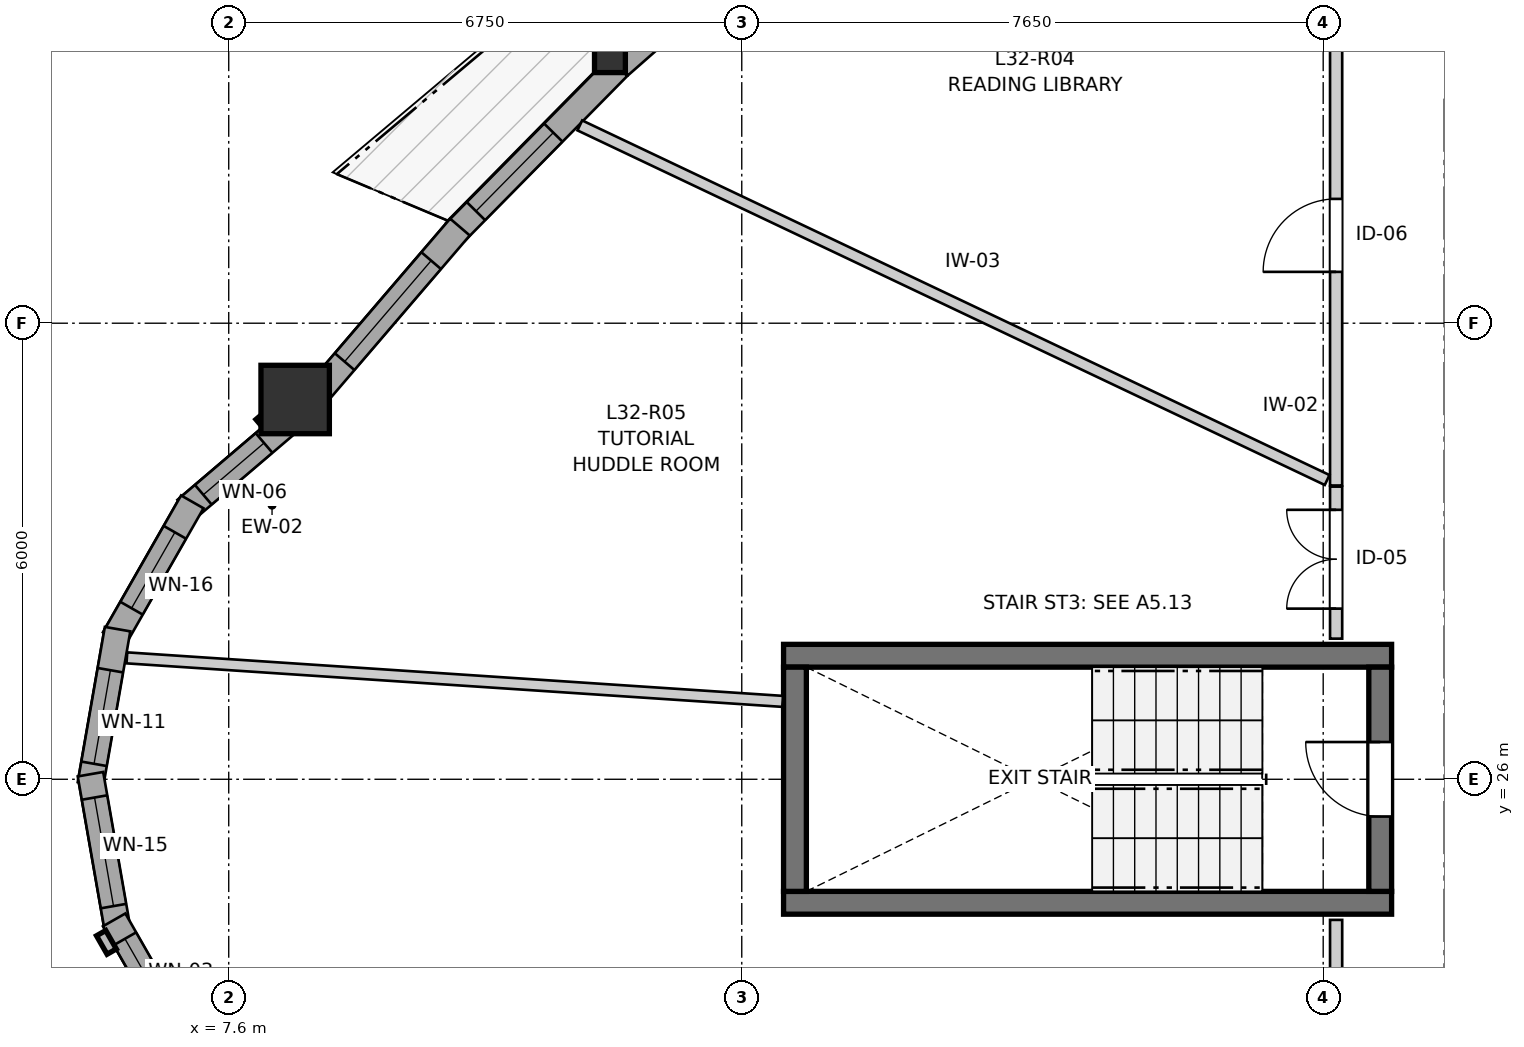
"""IFC4 building model, lengths in metres.
Left out: names, types, materials, properties, quantities, classifications, styles, units other than length and angle.
Written with IfcOpenShell. Run it as: python <this file> out.ifc"""

import sys

from ifc_helpers import new_model, si_unit, direction, frame, frame_2d, origin, origin_2d, place, context, subcontext, project, spatial, rectangle, i_section, extrude, source, transform, mapped, element, fill, save


model = new_model("IFC4")
c1 = context("Model", 3, precision=1e-05, world=origin(), true_north=direction((0.0, 1.0)))
c2 = subcontext(c1, "Body", "Model", "MODEL_VIEW")
j1 = project(units=[si_unit("LENGTHUNIT", "METRE"), si_unit("PLANEANGLEUNIT", "RADIAN")], contexts=[c1])
p1 = place(None, origin())
s1 = spatial("IfcSite", under=j1, at=p1, CompositionType="ELEMENT")
p2 = place(p1, origin())
s2 = spatial("IfcBuilding", under=s1, at=p2, CompositionType="ELEMENT")
p3 = place(p2, frame((0.0, 0.0, 108.8)))
s3 = spatial("IfcBuildingStorey", under=s2, at=p3, CompositionType="ELEMENT", Elevation=108.8)
for number, where, z_axis, x_axis in (
    (1, (14.9, 24.375, 0.0), (0.0, 0.0, 1.0), (1.0, 0.0, 0.0)),
    (2, (22.9, 27.625, 0.0), (0.0, 0.0, 1.0), (-1.0, 0.0, 0.0)),
):
    element("IfcWall", number, at=place(p3, frame(where, z_axis=z_axis, x_axis=x_axis)), inside=s3, PredefinedType="SHEAR", context=c2, shape_type="SweptSolid", body=[
        extrude(rectangle(XDim=8.0, YDim=0.3, at=frame_2d((4.0, 0.0))), origin(), (0.0, 0.0, 1.0), 2.935),
    ])
p4 = place(p3, frame((15.05, 27.475, 0.0), z_axis=(0.0, 0.0, 1.0), x_axis=(0.0, -1.0, 0.0)))
e3 = element("IfcWall", 3, at=p4, inside=s3, PredefinedType="SHEAR", context=c2, shape_type="SweptSolid", body=[
    extrude(rectangle(XDim=2.95, YDim=0.3, at=frame_2d((1.475, 0.0))), origin(), (0.0, 0.0, 1.0), 2.935),
])
p5 = place(p3, frame((22.75, 24.525, 0.0), z_axis=(0.0, 0.0, 1.0), x_axis=(0.0, 1.0, 0.0)))
e4 = element("IfcWall", 4, at=p5, inside=s3, PredefinedType="SHEAR", context=c2, shape_type="SweptSolid", body=[
    extrude(rectangle(XDim=2.95, YDim=0.3, at=frame_2d((1.475, 0.0))), origin(), (0.0, 0.0, 1.0), 2.935),
])
p6 = place(p5, frame((0.985, 0.0, 0.0)))
e5 = element("IfcOpeningElement", 5, at=p6, cuts=e4, PredefinedType="OPENING", context=c2, shape_type="SweptSolid", body=[
    extrude(rectangle(XDim=0.98, YDim=2.15, at=frame_2d((0.49, 1.075))), frame((0.0, 0.16, 0.0), z_axis=(0.0, -1.0, 0.0), x_axis=(1.0, 0.0, 0.0)), (0.0, 0.0, 1.0), 0.32),
])
m1 = source(origin(), c2, "Body", "SweptSolid", [
    extrude(rectangle(XDim=0.9, YDim=0.9, at=origin_2d()), origin(), (0.0, 0.0, 1.0), 2.935),
])
p7 = place(p3, frame((8.474, 30.996, 0.0), z_axis=(0.0, 0.0, 1.0), x_axis=(1.0, 0.0, 0.0)))
e6 = element("IfcColumn", 6, at=p7, inside=s3, PredefinedType="COLUMN", context=c2, shape_type="MappedRepresentation", body=[
    mapped(m1, transform((0.0, 0.0, 0.0), x_axis=(1.0, 0.0, 0.0), y_axis=(0.0, 1.0, 0.0), z_axis=(0.0, 0.0, 1.0), scale=1.0)),
])
m2 = source(origin(), c2, "Body", "SweptSolid", [
    extrude(i_section(OverallWidth=0.406, OverallDepth=0.416, WebThickness=0.027, FlangeThickness=0.044, FilletRadius=0.015, at=origin_2d()), origin(), (0.0, 0.0, 1.0), 2.935),
])
p8 = place(p3, frame((12.616, 35.505, 0.0), z_axis=(0.0, 0.0, 1.0), x_axis=(1.0, 0.0, 0.0)))
e7 = element("IfcColumn", 7, at=p8, inside=s3, PredefinedType="PILASTER", context=c2, shape_type="MappedRepresentation", body=[
    mapped(m2, transform((0.0, 0.0, 0.0), x_axis=(1.0, 0.0, 0.0), y_axis=(0.0, 1.0, 0.0), z_axis=(0.0, 0.0, 1.0), scale=1.0)),
])
p9 = place(p3, frame((8.409, 30.718, 0.0), z_axis=(0.0, 0.0, 1.0), x_axis=(-0.761134405886, -0.648594184507, 0.0)))
e8 = element("IfcWall", 8, at=p9, inside=s3, PredefinedType="SOLIDWALL", context=c2, shape_type="SweptSolid", body=[
    extrude(rectangle(XDim=1.805, YDim=0.34, at=frame_2d((0.902, 0.0))), origin(), (0.0, 0.0, 1.0), 2.465),
])
p10 = place(p9, frame((0.452, 0.0, 0.82)))
e9 = element("IfcOpeningElement", 9, at=p10, cuts=e8, PredefinedType="OPENING", context=c2, shape_type="SweptSolid", body=[
    extrude(rectangle(XDim=1.05, YDim=1.45, at=frame_2d((0.525, 0.725))), frame((0.0, 0.18, 0.0), z_axis=(0.0, -1.0, 0.0), x_axis=(1.0, 0.0, 0.0)), (0.0, 0.0, 1.0), 0.36),
])
p11 = place(p3, frame((7.121, 29.65, 0.0), z_axis=(0.0, 0.0, 1.0), x_axis=(-0.496037473582, -0.868301114132, 0.0)))
e10 = element("IfcWall", 10, at=p11, inside=s3, PredefinedType="SOLIDWALL", context=c2, shape_type="SweptSolid", body=[
    extrude(rectangle(XDim=2.073, YDim=0.34, at=frame_2d((1.037, 0.0))), origin(), (0.0, 0.0, 1.0), 2.465),
])
p12 = place(p11, frame((0.461, 0.0, 0.82)))
e11 = element("IfcOpeningElement", 11, at=p12, cuts=e10, PredefinedType="OPENING", context=c2, shape_type="SweptSolid", body=[
    extrude(rectangle(XDim=1.15, YDim=1.2, at=frame_2d((0.575, 0.6))), frame((0.0, 0.18, 0.0), z_axis=(0.0, -1.0, 0.0), x_axis=(1.0, 0.0, 0.0)), (0.0, 0.0, 1.0), 0.36),
])
p13 = place(p3, frame((6.138, 27.975, 0.0), z_axis=(0.0, 0.0, 1.0), x_axis=(-0.172186061474, -0.985064444711, 0.0)))
e12 = element("IfcWall", 12, at=p13, inside=s3, PredefinedType="SOLIDWALL", context=c2, shape_type="SweptSolid", body=[
    extrude(rectangle(XDim=2.073, YDim=0.34, at=frame_2d((1.037, 0.0))), origin(), (0.0, 0.0, 1.0), 2.465),
])
p14 = place(p13, frame((0.549, 0.0, 0.82)))
e13 = element("IfcOpeningElement", 13, at=p14, cuts=e12, PredefinedType="OPENING", context=c2, shape_type="SweptSolid", body=[
    extrude(rectangle(XDim=1.25, YDim=1.35, at=frame_2d((0.625, 0.675))), frame((0.0, 0.18, 0.0), z_axis=(0.0, -1.0, 0.0), x_axis=(1.0, 0.0, 0.0)), (0.0, 0.0, 1.0), 0.36),
])
p15 = place(p3, frame((5.781, 26.067, 0.0), z_axis=(0.0, 0.0, 1.0), x_axis=(0.172186061474, -0.985064444711, 0.0)))
e14 = element("IfcWall", 14, at=p15, inside=s3, PredefinedType="SOLIDWALL", context=c2, shape_type="SweptSolid", body=[
    extrude(rectangle(XDim=2.073, YDim=0.34, at=frame_2d((1.037, 0.0))), origin(), (0.0, 0.0, 1.0), 2.465),
])
p16 = place(p15, frame((0.312, 0.0, 0.82)))
e15 = element("IfcOpeningElement", 15, at=p16, cuts=e14, PredefinedType="OPENING", context=c2, shape_type="SweptSolid", body=[
    extrude(rectangle(XDim=1.45, YDim=1.25, at=frame_2d((0.725, 0.625))), frame((0.0, 0.18, 0.0), z_axis=(0.0, -1.0, 0.0), x_axis=(1.0, 0.0, 0.0)), (0.0, 0.0, 1.0), 0.36),
])
p17 = place(p3, frame((6.092, 24.15, 0.0), z_axis=(0.0, 0.0, 1.0), x_axis=(0.496037473582, -0.868301114132, 0.0)))
e16 = element("IfcWall", 16, at=p17, inside=s3, PredefinedType="SOLIDWALL", context=c2, shape_type="SweptSolid", body=[
    extrude(rectangle(XDim=2.073, YDim=0.34, at=frame_2d((1.037, 0.0))), origin(), (0.0, 0.0, 1.0), 2.465),
])
p18 = place(p17, frame((0.287, 0.0, 0.82)))
e17 = element("IfcOpeningElement", 17, at=p18, cuts=e16, PredefinedType="OPENING", context=c2, shape_type="SweptSolid", body=[
    extrude(rectangle(XDim=1.5, YDim=1.45, at=frame_2d((0.75, 0.725))), frame((0.0, 0.18, 0.0), z_axis=(0.0, -1.0, 0.0), x_axis=(1.0, 0.0, 0.0)), (0.0, 0.0, 1.0), 0.36),
])
p19 = place(p3, frame((14.997, 37.37, 0.0), z_axis=(0.0, 0.0, 1.0), x_axis=(-0.751446130796, -0.659794447166, 0.0)))
e18 = element("IfcWall", 18, at=p19, inside=s3, PredefinedType="SOLIDWALL", context=c2, shape_type="SweptSolid", body=[
    extrude(rectangle(XDim=3.0, YDim=0.34, at=frame_2d((1.5, 0.0))), origin(), (0.0, 0.0, 1.0), 2.465),
])
p20 = place(p19, frame((1.035, 0.0, 0.82)))
e19 = element("IfcOpeningElement", 19, at=p20, cuts=e18, PredefinedType="OPENING", context=c2, shape_type="SweptSolid", body=[
    extrude(rectangle(XDim=0.95, YDim=1.35, at=frame_2d((0.475, 0.675))), frame((0.0, 0.18, 0.0), z_axis=(0.0, -1.0, 0.0), x_axis=(1.0, 0.0, 0.0)), (0.0, 0.0, 1.0), 0.36),
])
p21 = place(p3, frame((12.723, 35.372, 0.0), z_axis=(0.0, 0.0, 1.0), x_axis=(-0.701922597509, -0.71225323243, 0.0)))
e20 = element("IfcWall", 20, at=p21, inside=s3, PredefinedType="SOLIDWALL", context=c2, shape_type="SweptSolid", body=[
    extrude(rectangle(XDim=3.049, YDim=0.34, at=frame_2d((1.524, 0.0))), origin(), (0.0, 0.0, 1.0), 2.465),
])
p22 = place(p21, frame((1.214, 0.0, 0.82)))
e21 = element("IfcOpeningElement", 21, at=p22, cuts=e20, PredefinedType="OPENING", context=c2, shape_type="SweptSolid", body=[
    extrude(rectangle(XDim=1.45, YDim=1.25, at=frame_2d((0.725, 0.625))), frame((0.0, 0.18, 0.0), z_axis=(0.0, -1.0, 0.0), x_axis=(1.0, 0.0, 0.0)), (0.0, 0.0, 1.0), 0.36),
])
p23 = place(p3, frame((10.642, 33.265, 0.0), z_axis=(0.0, 0.0, 1.0), x_axis=(-0.650694416433, -0.759339697647, 0.0)))
e22 = element("IfcWall", 22, at=p23, inside=s3, PredefinedType="SOLIDWALL", context=c2, shape_type="SweptSolid", body=[
    extrude(rectangle(XDim=2.903, YDim=0.34, at=frame_2d((1.452, 0.0))), origin(), (0.0, 0.0, 1.0), 2.465),
])
p24 = place(p23, frame((0.582, 0.0, 0.82)))
e23 = element("IfcOpeningElement", 23, at=p24, cuts=e22, PredefinedType="OPENING", context=c2, shape_type="SweptSolid", body=[
    extrude(rectangle(XDim=1.75, YDim=1.3, at=frame_2d((0.875, 0.65))), frame((0.0, 0.18, 0.0), z_axis=(0.0, -1.0, 0.0), x_axis=(1.0, 0.0, 0.0)), (0.0, 0.0, 1.0), 0.36),
])
p25 = place(p3, frame((22.17, 29.865, 0.0), z_axis=(0.0, 0.0, 1.0), x_axis=(0.0, 1.0, 0.0)))
e24 = element("IfcWall", 24, at=p25, inside=s3, PredefinedType="PARTITIONING", context=c2, shape_type="SweptSolid", body=[
    extrude(rectangle(XDim=6.565, YDim=0.16, at=frame_2d((3.282, 0.0))), origin(), (0.0, 0.0, 1.0), 2.935),
])
p26 = place(p25, frame((2.811, 0.0, 0.0)))
e25 = element("IfcOpeningElement", 25, at=p26, cuts=e24, PredefinedType="OPENING", context=c2, shape_type="SweptSolid", body=[
    extrude(rectangle(XDim=0.96, YDim=2.1, at=frame_2d((0.48, 1.05))), frame((0.0, 0.09, 0.0), z_axis=(0.0, -1.0, 0.0), x_axis=(1.0, 0.0, 0.0)), (0.0, 0.0, 1.0), 0.18),
])
p27 = place(p3, frame((22.17, 20.14, 0.0), z_axis=(0.0, 0.0, 1.0), x_axis=(0.0, 1.0, 0.0)))
e26 = element("IfcWall", 26, at=p27, inside=s3, PredefinedType="PARTITIONING", context=c2, shape_type="SweptSolid", body=[
    extrude(rectangle(XDim=4.01, YDim=0.16, at=frame_2d((2.005, 0.0))), origin(), (0.0, 0.0, 1.0), 2.935),
])
p28 = place(p27, frame((1.375, 0.0, 0.0)))
e27 = element("IfcOpeningElement", 27, at=p28, cuts=e26, PredefinedType="OPENING", context=c2, shape_type="SweptSolid", body=[
    extrude(rectangle(XDim=1.3, YDim=2.1, at=frame_2d((0.65, 1.05))), frame((0.0, 0.09, 0.0), z_axis=(0.0, -1.0, 0.0), x_axis=(1.0, 0.0, 0.0)), (0.0, 0.0, 1.0), 0.18),
])
p29 = place(p3, frame((22.17, 27.85, 0.0), z_axis=(0.0, 0.0, 1.0), x_axis=(0.0, 1.0, 0.0)))
e28 = element("IfcWall", 28, at=p29, inside=s3, PredefinedType="PARTITIONING", context=c2, shape_type="SweptSolid", body=[
    extrude(rectangle(XDim=2.0, YDim=0.16, at=frame_2d((1.0, 0.0))), origin(), (0.0, 0.0, 1.0), 2.935),
])
p30 = place(p29, frame((0.395, 0.0, 0.0)))
e29 = element("IfcOpeningElement", 29, at=p30, cuts=e28, PredefinedType="OPENING", context=c2, shape_type="SweptSolid", body=[
    extrude(rectangle(XDim=1.3, YDim=2.1, at=frame_2d((0.65, 1.05))), frame((0.0, 0.09, 0.0), z_axis=(0.0, -1.0, 0.0), x_axis=(1.0, 0.0, 0.0)), (0.0, 0.0, 1.0), 0.18),
])
p31 = place(p3, frame((12.219, 34.602, 0.0), z_axis=(0.0, 0.0, 1.0), x_axis=(0.90346129999, -0.428669662351, 0.0)))
e30 = element("IfcWall", 30, at=p31, inside=s3, PredefinedType="PARTITIONING", context=c2, shape_type="SweptSolid", body=[
    extrude(rectangle(XDim=10.883, YDim=0.145, at=frame_2d((5.441, 0.0))), origin(), (0.0, 0.0, 1.0), 2.935),
])
p32 = place(p3, frame((6.26, 27.597, 0.0), z_axis=(0.0, 0.0, 1.0), x_axis=(0.997805352235, -0.066215398902, 0.0)))
e31 = element("IfcWall", 31, at=p32, inside=s3, PredefinedType="PARTITIONING", context=c2, shape_type="SweptSolid", body=[
    extrude(rectangle(XDim=8.646, YDim=0.145, at=frame_2d((4.323, 0.0))), origin(), (0.0, 0.0, 1.0), 2.935),
])
m3 = source(origin(), c2, "Body", "SweptSolid", [
    extrude(rectangle(XDim=1.05, YDim=1.45, at=frame_2d((0.525, 0.725))), frame((0.0, 0.03, 0.0), z_axis=(0.0, -1.0, 0.0), x_axis=(1.0, 0.0, 0.0)), (0.0, 0.0, 1.0), 0.06),
])
p33 = place(p10, origin())
e32 = element("IfcWindow", 32, at=p33, inside=s3, PartitioningType="SINGLE_PANEL", PredefinedType="WINDOW", context=c2, shape_type="MappedRepresentation", body=[
    mapped(m3, transform((0.0, 0.0, 0.0), x_axis=(1.0, 0.0, 0.0), y_axis=(0.0, 1.0, 0.0), z_axis=(0.0, 0.0, 1.0), scale=1.0)),
])
fill(e9, e32)
m4 = source(origin(), c2, "Body", "SweptSolid", [
    extrude(rectangle(XDim=1.15, YDim=1.2, at=frame_2d((0.575, 0.6))), frame((0.0, 0.03, 0.0), z_axis=(0.0, -1.0, 0.0), x_axis=(1.0, 0.0, 0.0)), (0.0, 0.0, 1.0), 0.06),
])
p34 = place(p12, origin())
e33 = element("IfcWindow", 33, at=p34, inside=s3, PartitioningType="SINGLE_PANEL", PredefinedType="WINDOW", context=c2, shape_type="MappedRepresentation", body=[
    mapped(m4, transform((0.0, 0.0, 0.0), x_axis=(1.0, 0.0, 0.0), y_axis=(0.0, 1.0, 0.0), z_axis=(0.0, 0.0, 1.0), scale=1.0)),
])
fill(e11, e33)
m5 = source(origin(), c2, "Body", "SweptSolid", [
    extrude(rectangle(XDim=1.25, YDim=1.35, at=frame_2d((0.625, 0.675))), frame((0.0, 0.03, 0.0), z_axis=(0.0, -1.0, 0.0), x_axis=(1.0, 0.0, 0.0)), (0.0, 0.0, 1.0), 0.06),
])
p35 = place(p14, origin())
e34 = element("IfcWindow", 34, at=p35, inside=s3, PartitioningType="SINGLE_PANEL", PredefinedType="WINDOW", context=c2, shape_type="MappedRepresentation", body=[
    mapped(m5, transform((0.0, 0.0, 0.0), x_axis=(1.0, 0.0, 0.0), y_axis=(0.0, 1.0, 0.0), z_axis=(0.0, 0.0, 1.0), scale=1.0)),
])
fill(e13, e34)
m6 = source(origin(), c2, "Body", "SweptSolid", [
    extrude(rectangle(XDim=1.45, YDim=1.25, at=frame_2d((0.725, 0.625))), frame((0.0, 0.03, 0.0), z_axis=(0.0, -1.0, 0.0), x_axis=(1.0, 0.0, 0.0)), (0.0, 0.0, 1.0), 0.06),
])
p36 = place(p16, origin())
e35 = element("IfcWindow", 35, at=p36, inside=s3, PartitioningType="SINGLE_PANEL", PredefinedType="WINDOW", context=c2, shape_type="MappedRepresentation", body=[
    mapped(m6, transform((0.0, 0.0, 0.0), x_axis=(1.0, 0.0, 0.0), y_axis=(0.0, 1.0, 0.0), z_axis=(0.0, 0.0, 1.0), scale=1.0)),
])
fill(e15, e35)
m7 = source(origin(), c2, "Body", "SweptSolid", [
    extrude(rectangle(XDim=1.5, YDim=1.45, at=frame_2d((0.75, 0.725))), frame((0.0, 0.03, 0.0), z_axis=(0.0, -1.0, 0.0), x_axis=(1.0, 0.0, 0.0)), (0.0, 0.0, 1.0), 0.06),
])
p37 = place(p18, origin())
e36 = element("IfcWindow", 36, at=p37, inside=s3, PartitioningType="SINGLE_PANEL", PredefinedType="WINDOW", context=c2, shape_type="MappedRepresentation", body=[
    mapped(m7, transform((0.0, 0.0, 0.0), x_axis=(1.0, 0.0, 0.0), y_axis=(0.0, 1.0, 0.0), z_axis=(0.0, 0.0, 1.0), scale=1.0)),
])
fill(e17, e36)
p38 = place(p22, origin())
e37 = element("IfcWindow", 37, at=p38, inside=s3, PartitioningType="SINGLE_PANEL", PredefinedType="WINDOW", context=c2, shape_type="MappedRepresentation", body=[
    mapped(m6, transform((0.0, 0.0, 0.0), x_axis=(1.0, 0.0, 0.0), y_axis=(0.0, 1.0, 0.0), z_axis=(0.0, 0.0, 1.0), scale=1.0)),
])
fill(e21, e37)
m8 = source(origin(), c2, "Body", "SweptSolid", [
    extrude(rectangle(XDim=1.75, YDim=1.3, at=frame_2d((0.875, 0.65))), frame((0.0, 0.03, 0.0), z_axis=(0.0, -1.0, 0.0), x_axis=(1.0, 0.0, 0.0)), (0.0, 0.0, 1.0), 0.06),
])
p39 = place(p24, origin())
e38 = element("IfcWindow", 38, at=p39, inside=s3, PartitioningType="SINGLE_PANEL", PredefinedType="WINDOW", context=c2, shape_type="MappedRepresentation", body=[
    mapped(m8, transform((0.0, 0.0, 0.0), x_axis=(1.0, 0.0, 0.0), y_axis=(0.0, 1.0, 0.0), z_axis=(0.0, 0.0, 1.0), scale=1.0)),
])
fill(e23, e38)
m9 = source(origin(), c2, "Body", "SweptSolid", [
    extrude(rectangle(XDim=0.98, YDim=2.15, at=frame_2d((0.49, 1.075))), frame((0.0, 0.025, 0.0), z_axis=(0.0, -1.0, 0.0), x_axis=(1.0, 0.0, 0.0)), (0.0, 0.0, 1.0), 0.05),
])
p40 = place(p6, origin())
e39 = element("IfcDoor", 39, at=p40, inside=s3, OperationType="SINGLE_SWING_RIGHT", PredefinedType="DOOR", context=c2, shape_type="MappedRepresentation", body=[
    mapped(m9, transform((0.0, 0.0, 0.0), x_axis=(1.0, 0.0, 0.0), y_axis=(0.0, 1.0, 0.0), z_axis=(0.0, 0.0, 1.0), scale=1.0)),
])
fill(e5, e39)
m10 = source(origin(), c2, "Body", "SweptSolid", [
    extrude(rectangle(XDim=0.96, YDim=2.1, at=frame_2d((0.48, 1.05))), frame((0.0, 0.025, 0.0), z_axis=(0.0, -1.0, 0.0), x_axis=(1.0, 0.0, 0.0)), (0.0, 0.0, 1.0), 0.05),
])
p41 = place(p26, origin())
e40 = element("IfcDoor", 40, at=p41, inside=s3, OperationType="SINGLE_SWING_LEFT", PredefinedType="DOOR", context=c2, shape_type="MappedRepresentation", body=[
    mapped(m10, transform((0.0, 0.0, 0.0), x_axis=(1.0, 0.0, 0.0), y_axis=(0.0, 1.0, 0.0), z_axis=(0.0, 0.0, 1.0), scale=1.0)),
])
fill(e25, e40)
m11 = source(origin(), c2, "Body", "SweptSolid", [
    extrude(rectangle(XDim=1.3, YDim=2.1, at=frame_2d((0.65, 1.05))), frame((0.0, 0.025, 0.0), z_axis=(0.0, -1.0, 0.0), x_axis=(1.0, 0.0, 0.0)), (0.0, 0.0, 1.0), 0.05),
])
p42 = place(p30, origin())
e41 = element("IfcDoor", 41, at=p42, inside=s3, OperationType="DOUBLE_DOOR_SINGLE_SWING", PredefinedType="DOOR", context=c2, shape_type="MappedRepresentation", body=[
    mapped(m11, transform((0.0, 0.0, 0.0), x_axis=(1.0, 0.0, 0.0), y_axis=(0.0, 1.0, 0.0), z_axis=(0.0, 0.0, 1.0), scale=1.0)),
])
fill(e29, e41)
save(model, sys.argv[1])
